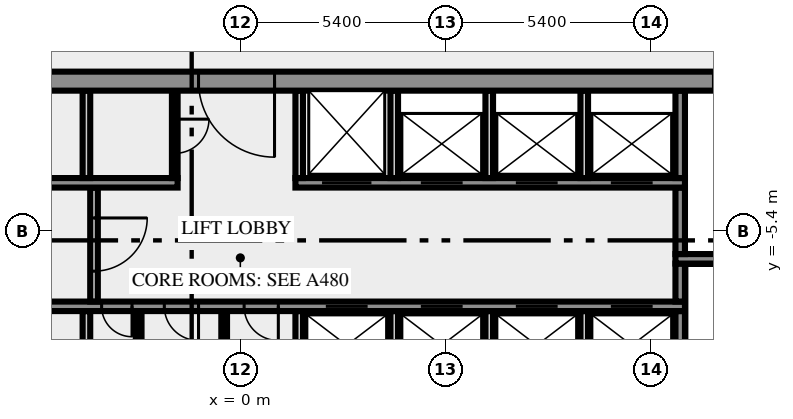
"""IFC4 building model, lengths in metres.
Left out: names, types, materials, properties, quantities, classifications, styles, units other than length and angle.
Written with IfcOpenShell. Run it as: python <this file> out.ifc"""

import sys

from ifc_helpers import new_model, si_unit, direction, frame, frame_2d, origin, place, context, subcontext, project, spatial, rectangle, extrude, element, fill, save


model = new_model("IFC4")
c1 = context("Model", 3, precision=1e-05, world=origin(), true_north=direction((0.0, 1.0)))
c2 = subcontext(c1, "Body", "Model", "MODEL_VIEW")
j1 = project(units=[si_unit("LENGTHUNIT", "METRE"), si_unit("PLANEANGLEUNIT", "RADIAN")], contexts=[c1])
p1 = place(None, origin())
s1 = spatial("IfcSite", under=j1, at=p1, CompositionType="ELEMENT")
p2 = place(p1, origin())
s2 = spatial("IfcBuilding", under=s1, at=p2, CompositionType="ELEMENT")
p3 = place(p2, frame((0.0, 0.0, 152.0)))
s3 = spatial("IfcBuildingStorey", under=s2, at=p3, CompositionType="ELEMENT", Elevation=152.0)
p4 = place(p3, frame((-4.05, -10.5, 0.0), z_axis=(0.0, 0.0, 1.0), x_axis=(0.0, 1.0, 0.0)))
e1 = element("IfcWall", 1, at=p4, inside=s3, PredefinedType="SOLIDWALL", context=c2, shape_type="SweptSolid", body=[
    extrude(rectangle(XDim=3.0, YDim=0.2, at=frame_2d((1.5, 0.0))), origin(), (0.0, 0.0, 1.0), 3.65),
])
for number, where, z_axis, x_axis in (
    (2, (-2.675, -10.5, 0.0), (0.0, 0.0, 1.0), (0.0, 1.0, 0.0)),
    (3, (-0.425, -10.5, 0.0), (0.0, 0.0, 1.0), (0.0, 1.0, 0.0)),
):
    element("IfcWall", number, at=place(p3, frame(where, z_axis=z_axis, x_axis=x_axis)), inside=s3, PredefinedType="PARTITIONING", context=c2, shape_type="SweptSolid", body=[
        extrude(rectangle(XDim=3.0, YDim=0.15, at=frame_2d((1.5, 0.0))), origin(), (0.0, 0.0, 1.0), 3.65),
    ])
for number, where, z_axis, x_axis in (
    (4, (1.55, -10.5, 0.0), (0.0, 0.0, 1.0), (0.0, 1.0, 0.0)),
    (5, (4.05, -10.5, 0.0), (0.0, 0.0, 1.0), (0.0, 1.0, 0.0)),
    (6, (6.55, -10.5, 0.0), (0.0, 0.0, 1.0), (0.0, 1.0, 0.0)),
    (7, (9.05, -10.5, 0.0), (0.0, 0.0, 1.0), (0.0, 1.0, 0.0)),
):
    element("IfcWall", number, at=place(p3, frame(where, z_axis=z_axis, x_axis=x_axis)), inside=s3, PredefinedType="SOLIDWALL", context=c2, shape_type="SweptSolid", body=[
        extrude(rectangle(XDim=3.0, YDim=0.2, at=frame_2d((1.5, 0.0))), origin(), (0.0, 0.0, 1.0), 3.65),
    ])
p5 = place(p3, frame((11.575, -10.5, 0.0), z_axis=(0.0, 0.0, 1.0), x_axis=(0.0, 1.0, 0.0)))
e8 = element("IfcWall", 8, at=p5, inside=s3, PredefinedType="SHEAR", context=c2, shape_type="SweptSolid", body=[
    extrude(rectangle(XDim=3.0, YDim=0.25, at=frame_2d((1.5, 0.0))), origin(), (0.0, 0.0, 1.0), 3.65),
])
p6 = place(p3, frame((11.7, -7.375, 0.0), z_axis=(0.0, 0.0, 1.0), x_axis=(-1.0, 0.0, 0.0)))
e9 = element("IfcWall", 9, at=p6, inside=s3, PredefinedType="SHEAR", context=c2, shape_type="SweptSolid", body=[
    extrude(rectangle(XDim=23.4, YDim=0.25, at=frame_2d((11.7, 0.0))), origin(), (0.0, 0.0, 1.0), 3.65),
])
p7 = place(p6, frame((21.812, 0.0, 0.0)))
e10 = element("IfcOpeningElement", 10, at=p7, cuts=e9, PredefinedType="OPENING", context=c2, shape_type="SweptSolid", body=[
    extrude(rectangle(XDim=0.9, YDim=2.1, at=frame_2d((0.45, 1.05))), frame((0.0, 0.135, 0.0), z_axis=(0.0, -1.0, 0.0), x_axis=(1.0, 0.0, 0.0)), (0.0, 0.0, 1.0), 0.27),
])
p8 = place(p6, frame((19.55, 0.0, 0.0)))
e11 = element("IfcOpeningElement", 11, at=p8, cuts=e9, PredefinedType="OPENING", context=c2, shape_type="SweptSolid", body=[
    extrude(rectangle(XDim=0.9, YDim=2.1, at=frame_2d((0.45, 1.05))), frame((0.0, 0.135, 0.0), z_axis=(0.0, -1.0, 0.0), x_axis=(1.0, 0.0, 0.0)), (0.0, 0.0, 1.0), 0.27),
])
p9 = place(p6, frame((16.787, 0.0, 0.0)))
e12 = element("IfcOpeningElement", 12, at=p9, cuts=e9, PredefinedType="OPENING", context=c2, shape_type="SweptSolid", body=[
    extrude(rectangle(XDim=0.9, YDim=2.1, at=frame_2d((0.45, 1.05))), frame((0.0, 0.135, 0.0), z_axis=(0.0, -1.0, 0.0), x_axis=(1.0, 0.0, 0.0)), (0.0, 0.0, 1.0), 0.27),
])
p10 = place(p6, frame((14.55, 0.0, 0.0)))
e13 = element("IfcOpeningElement", 13, at=p10, cuts=e9, PredefinedType="OPENING", context=c2, shape_type="SweptSolid", body=[
    extrude(rectangle(XDim=0.8, YDim=2.1, at=frame_2d((0.4, 1.05))), frame((0.0, 0.135, 0.0), z_axis=(0.0, -1.0, 0.0), x_axis=(1.0, 0.0, 0.0)), (0.0, 0.0, 1.0), 0.27),
])
p11 = place(p6, frame((12.8, 0.0, 0.0)))
e14 = element("IfcOpeningElement", 14, at=p11, cuts=e9, PredefinedType="OPENING", context=c2, shape_type="SweptSolid", body=[
    extrude(rectangle(XDim=0.9, YDim=2.1, at=frame_2d((0.45, 1.05))), frame((0.0, 0.135, 0.0), z_axis=(0.0, -1.0, 0.0), x_axis=(1.0, 0.0, 0.0)), (0.0, 0.0, 1.0), 0.27),
])
p12 = place(p6, frame((10.7, 0.0, 0.0)))
e15 = element("IfcOpeningElement", 15, at=p12, cuts=e9, PredefinedType="OPENING", context=c2, shape_type="SweptSolid", body=[
    extrude(rectangle(XDim=0.9, YDim=2.1, at=frame_2d((0.45, 1.05))), frame((0.0, 0.135, 0.0), z_axis=(0.0, -1.0, 0.0), x_axis=(1.0, 0.0, 0.0)), (0.0, 0.0, 1.0), 0.27),
])
p13 = place(p6, frame((8.35, 0.0, 0.0)))
e16 = element("IfcOpeningElement", 16, at=p13, cuts=e9, PredefinedType="OPENING", context=c2, shape_type="SweptSolid", body=[
    extrude(rectangle(XDim=1.1, YDim=2.1, at=frame_2d((0.55, 1.05))), frame((0.0, 0.135, 0.0), z_axis=(0.0, -1.0, 0.0), x_axis=(1.0, 0.0, 0.0)), (0.0, 0.0, 1.0), 0.27),
])
p14 = place(p6, frame((5.85, 0.0, 0.0)))
e17 = element("IfcOpeningElement", 17, at=p14, cuts=e9, PredefinedType="OPENING", context=c2, shape_type="SweptSolid", body=[
    extrude(rectangle(XDim=1.1, YDim=2.1, at=frame_2d((0.55, 1.05))), frame((0.0, 0.135, 0.0), z_axis=(0.0, -1.0, 0.0), x_axis=(1.0, 0.0, 0.0)), (0.0, 0.0, 1.0), 0.27),
])
p15 = place(p6, frame((3.35, 0.0, 0.0)))
e18 = element("IfcOpeningElement", 18, at=p15, cuts=e9, PredefinedType="OPENING", context=c2, shape_type="SweptSolid", body=[
    extrude(rectangle(XDim=1.1, YDim=2.1, at=frame_2d((0.55, 1.05))), frame((0.0, 0.135, 0.0), z_axis=(0.0, -1.0, 0.0), x_axis=(1.0, 0.0, 0.0)), (0.0, 0.0, 1.0), 0.27),
])
p16 = place(p6, frame((0.85, 0.0, 0.0)))
e19 = element("IfcOpeningElement", 19, at=p16, cuts=e9, PredefinedType="OPENING", context=c2, shape_type="SweptSolid", body=[
    extrude(rectangle(XDim=1.1, YDim=2.1, at=frame_2d((0.55, 1.05))), frame((0.0, 0.135, 0.0), z_axis=(0.0, -1.0, 0.0), x_axis=(1.0, 0.0, 0.0)), (0.0, 0.0, 1.0), 0.27),
])
p17 = place(p3, frame((-3.85, -4.25, 0.0), z_axis=(0.0, 0.0, 1.0), x_axis=(0.0, -1.0, 0.0)))
e20 = element("IfcWall", 20, at=p17, inside=s3, PredefinedType="SOLIDWALL", context=c2, shape_type="SweptSolid", body=[
    extrude(rectangle(XDim=3.0, YDim=0.2, at=frame_2d((1.5, 0.0))), origin(), (0.0, 0.0, 1.0), 3.65),
])
p18 = place(p17, frame((0.8, 0.0, 0.0)))
e21 = element("IfcOpeningElement", 21, at=p18, cuts=e20, PredefinedType="OPENING", context=c2, shape_type="SweptSolid", body=[
    extrude(rectangle(XDim=1.4, YDim=2.1, at=frame_2d((0.7, 1.05))), frame((0.0, 0.11, 0.0), z_axis=(0.0, -1.0, 0.0), x_axis=(1.0, 0.0, 0.0)), (0.0, 0.0, 1.0), 0.22),
])
p19 = place(p3, frame((11.575, -7.25, 0.0), z_axis=(0.0, 0.0, 1.0), x_axis=(0.0, 1.0, 0.0)))
e22 = element("IfcWall", 22, at=p19, inside=s3, PredefinedType="SHEAR", context=c2, shape_type="SweptSolid", body=[
    extrude(rectangle(XDim=1.0, YDim=0.25, at=frame_2d((0.5, 0.0))), origin(), (0.0, 0.0, 1.0), 3.65),
])
p20 = place(p3, frame((19.5, -6.125, 0.0), z_axis=(0.0, 0.0, 1.0), x_axis=(-1.0, 0.0, 0.0)))
e23 = element("IfcWall", 23, at=p20, inside=s3, PredefinedType="SHEAR", context=c2, shape_type="SweptSolid", body=[
    extrude(rectangle(XDim=8.05, YDim=0.25, at=frame_2d((4.025, 0.0))), origin(), (0.0, 0.0, 1.0), 3.65),
])
p21 = place(p20, frame((0.05, 0.0, 0.0)))
e24 = element("IfcOpeningElement", 24, at=p21, cuts=e23, PredefinedType="OPENING", context=c2, shape_type="SweptSolid", body=[
    extrude(rectangle(XDim=1.8, YDim=2.1, at=frame_2d((0.9, 1.05))), frame((0.0, 0.135, 0.0), z_axis=(0.0, -1.0, 0.0), x_axis=(1.0, 0.0, 0.0)), (0.0, 0.0, 1.0), 0.27),
])
p22 = place(p3, frame((11.575, -6.0, 0.0), z_axis=(0.0, 0.0, 1.0), x_axis=(0.0, 1.0, 0.0)))
e25 = element("IfcWall", 25, at=p22, inside=s3, PredefinedType="SHEAR", context=c2, shape_type="SweptSolid", body=[
    extrude(rectangle(XDim=1.75, YDim=0.25, at=frame_2d((0.875, 0.0))), origin(), (0.0, 0.0, 1.0), 3.65),
])
p23 = place(p3, frame((-11.7, -4.125, 0.0), z_axis=(0.0, 0.0, 1.0), x_axis=(1.0, 0.0, 0.0)))
e26 = element("IfcWall", 26, at=p23, inside=s3, PredefinedType="SHEAR", context=c2, shape_type="SweptSolid", body=[
    extrude(rectangle(XDim=10.05, YDim=0.25, at=frame_2d((5.025, 0.0))), origin(), (0.0, 0.0, 1.0), 3.65),
])
p24 = place(p3, frame((1.45, -4.125, 0.0), z_axis=(0.0, 0.0, 1.0), x_axis=(1.0, 0.0, 0.0)))
e27 = element("IfcWall", 27, at=p24, inside=s3, PredefinedType="SHEAR", context=c2, shape_type="SweptSolid", body=[
    extrude(rectangle(XDim=10.25, YDim=0.25, at=frame_2d((5.125, 0.0))), origin(), (0.0, 0.0, 1.0), 3.65),
])
p25 = place(p24, frame((0.7, 0.0, 0.0)))
e28 = element("IfcOpeningElement", 28, at=p25, cuts=e27, PredefinedType="OPENING", context=c2, shape_type="SweptSolid", body=[
    extrude(rectangle(XDim=1.3, YDim=2.1, at=frame_2d((0.65, 1.05))), frame((0.0, 0.135, 0.0), z_axis=(0.0, -1.0, 0.0), x_axis=(1.0, 0.0, 0.0)), (0.0, 0.0, 1.0), 0.27),
])
p26 = place(p24, frame((3.3, 0.0, 0.0)))
e29 = element("IfcOpeningElement", 29, at=p26, cuts=e27, PredefinedType="OPENING", context=c2, shape_type="SweptSolid", body=[
    extrude(rectangle(XDim=1.1, YDim=2.1, at=frame_2d((0.55, 1.05))), frame((0.0, 0.135, 0.0), z_axis=(0.0, -1.0, 0.0), x_axis=(1.0, 0.0, 0.0)), (0.0, 0.0, 1.0), 0.27),
])
p27 = place(p24, frame((5.8, 0.0, 0.0)))
e30 = element("IfcOpeningElement", 30, at=p27, cuts=e27, PredefinedType="OPENING", context=c2, shape_type="SweptSolid", body=[
    extrude(rectangle(XDim=1.1, YDim=2.1, at=frame_2d((0.55, 1.05))), frame((0.0, 0.135, 0.0), z_axis=(0.0, -1.0, 0.0), x_axis=(1.0, 0.0, 0.0)), (0.0, 0.0, 1.0), 0.27),
])
p28 = place(p24, frame((8.3, 0.0, 0.0)))
e31 = element("IfcOpeningElement", 31, at=p28, cuts=e27, PredefinedType="OPENING", context=c2, shape_type="SweptSolid", body=[
    extrude(rectangle(XDim=1.1, YDim=2.1, at=frame_2d((0.55, 1.05))), frame((0.0, 0.135, 0.0), z_axis=(0.0, -1.0, 0.0), x_axis=(1.0, 0.0, 0.0)), (0.0, 0.0, 1.0), 0.27),
])
p29 = place(p3, frame((-4.05, -4.0, 0.0), z_axis=(0.0, 0.0, 1.0), x_axis=(0.0, 1.0, 0.0)))
e32 = element("IfcWall", 32, at=p29, inside=s3, PredefinedType="SOLIDWALL", context=c2, shape_type="SweptSolid", body=[
    extrude(rectangle(XDim=2.3, YDim=0.2, at=frame_2d((1.15, 0.0))), origin(), (0.0, 0.0, 1.0), 3.65),
])
p30 = place(p3, frame((-1.725, -1.7, 0.0), z_axis=(0.0, 0.0, 1.0), x_axis=(0.0, -1.0, 0.0)))
e33 = element("IfcWall", 33, at=p30, inside=s3, PredefinedType="PARTITIONING", context=c2, shape_type="SweptSolid", body=[
    extrude(rectangle(XDim=2.3, YDim=0.15, at=frame_2d((1.15, 0.0))), origin(), (0.0, 0.0, 1.0), 3.65),
])
p31 = place(p30, frame((0.75, 0.0, 0.0)))
e34 = element("IfcOpeningElement", 34, at=p31, cuts=e33, PredefinedType="OPENING", context=c2, shape_type="SweptSolid", body=[
    extrude(rectangle(XDim=0.9, YDim=2.1, at=frame_2d((0.45, 1.05))), frame((0.0, 0.085, 0.0), z_axis=(0.0, -1.0, 0.0), x_axis=(1.0, 0.0, 0.0)), (0.0, 0.0, 1.0), 0.17),
])
for number, where, z_axis, x_axis in (
    (35, (1.55, -4.0, 0.0), (0.0, 0.0, 1.0), (0.0, 1.0, 0.0)),
    (36, (4.05, -4.0, 0.0), (0.0, 0.0, 1.0), (0.0, 1.0, 0.0)),
    (37, (6.55, -4.0, 0.0), (0.0, 0.0, 1.0), (0.0, 1.0, 0.0)),
    (38, (9.05, -4.0, 0.0), (0.0, 0.0, 1.0), (0.0, 1.0, 0.0)),
):
    element("IfcWall", number, at=place(p3, frame(where, z_axis=z_axis, x_axis=x_axis)), inside=s3, PredefinedType="SOLIDWALL", context=c2, shape_type="SweptSolid", body=[
        extrude(rectangle(XDim=2.3, YDim=0.2, at=frame_2d((1.15, 0.0))), origin(), (0.0, 0.0, 1.0), 3.65),
    ])
p32 = place(p3, frame((11.575, -4.0, 0.0), z_axis=(0.0, 0.0, 1.0), x_axis=(0.0, 1.0, 0.0)))
e39 = element("IfcWall", 39, at=p32, inside=s3, PredefinedType="SHEAR", context=c2, shape_type="SweptSolid", body=[
    extrude(rectangle(XDim=2.3, YDim=0.25, at=frame_2d((1.15, 0.0))), origin(), (0.0, 0.0, 1.0), 3.65),
])
p33 = place(p3, frame((20.49, -1.45, 0.0), z_axis=(0.0, 0.0, 1.0), x_axis=(-1.0, 0.0, 0.0)))
e40 = element("IfcWall", 40, at=p33, inside=s3, PredefinedType="SHEAR", context=c2, shape_type="SweptSolid", body=[
    extrude(rectangle(XDim=40.98, YDim=0.5, at=frame_2d((20.49, 0.0))), origin(), (0.0, 0.0, 1.0), 3.65),
])
p34 = place(p33, frame((38.14, 0.0, 0.0)))
e41 = element("IfcOpeningElement", 41, at=p34, cuts=e40, PredefinedType="OPENING", context=c2, shape_type="SweptSolid", body=[
    extrude(rectangle(XDim=1.8, YDim=2.1, at=frame_2d((0.9, 1.05))), frame((0.0, 0.26, 0.0), z_axis=(0.0, -1.0, 0.0), x_axis=(1.0, 0.0, 0.0)), (0.0, 0.0, 1.0), 0.52),
])
p35 = place(p33, frame((35.89, 0.0, 0.0)))
e42 = element("IfcOpeningElement", 42, at=p35, cuts=e40, PredefinedType="OPENING", context=c2, shape_type="SweptSolid", body=[
    extrude(rectangle(XDim=0.9, YDim=2.1, at=frame_2d((0.45, 1.05))), frame((0.0, 0.26, 0.0), z_axis=(0.0, -1.0, 0.0), x_axis=(1.0, 0.0, 0.0)), (0.0, 0.0, 1.0), 0.52),
])
p36 = place(p33, frame((32.94, 0.0, 0.0)))
e43 = element("IfcOpeningElement", 43, at=p36, cuts=e40, PredefinedType="OPENING", context=c2, shape_type="SweptSolid", body=[
    extrude(rectangle(XDim=0.9, YDim=2.1, at=frame_2d((0.45, 1.05))), frame((0.0, 0.26, 0.0), z_axis=(0.0, -1.0, 0.0), x_axis=(1.0, 0.0, 0.0)), (0.0, 0.0, 1.0), 0.52),
])
p37 = place(p33, frame((29.802, 0.0, 0.0)))
e44 = element("IfcOpeningElement", 44, at=p37, cuts=e40, PredefinedType="OPENING", context=c2, shape_type="SweptSolid", body=[
    extrude(rectangle(XDim=0.9, YDim=2.1, at=frame_2d((0.45, 1.05))), frame((0.0, 0.26, 0.0), z_axis=(0.0, -1.0, 0.0), x_axis=(1.0, 0.0, 0.0)), (0.0, 0.0, 1.0), 0.52),
])
p38 = place(p33, frame((26.077, 0.0, 0.0)))
e45 = element("IfcOpeningElement", 45, at=p38, cuts=e40, PredefinedType="OPENING", context=c2, shape_type="SweptSolid", body=[
    extrude(rectangle(XDim=0.9, YDim=2.1, at=frame_2d((0.45, 1.05))), frame((0.0, 0.26, 0.0), z_axis=(0.0, -1.0, 0.0), x_axis=(1.0, 0.0, 0.0)), (0.0, 0.0, 1.0), 0.52),
])
p39 = place(p33, frame((19.59, 0.0, 0.0)))
e46 = element("IfcOpeningElement", 46, at=p39, cuts=e40, PredefinedType="OPENING", context=c2, shape_type="SweptSolid", body=[
    extrude(rectangle(XDim=2.0, YDim=2.1, at=frame_2d((1.0, 1.05))), frame((0.0, 0.26, 0.0), z_axis=(0.0, -1.0, 0.0), x_axis=(1.0, 0.0, 0.0)), (0.0, 0.0, 1.0), 0.52),
])
p40 = place(p33, frame((7.14, 0.0, 0.0)))
e47 = element("IfcOpeningElement", 47, at=p40, cuts=e40, PredefinedType="OPENING", context=c2, shape_type="SweptSolid", body=[
    extrude(rectangle(XDim=0.9, YDim=2.1, at=frame_2d((0.45, 1.05))), frame((0.0, 0.26, 0.0), z_axis=(0.0, -1.0, 0.0), x_axis=(1.0, 0.0, 0.0)), (0.0, 0.0, 1.0), 0.52),
])
p41 = place(p33, frame((5.028, 0.0, 0.0)))
e48 = element("IfcOpeningElement", 48, at=p41, cuts=e40, PredefinedType="OPENING", context=c2, shape_type="SweptSolid", body=[
    extrude(rectangle(XDim=0.8, YDim=2.1, at=frame_2d((0.4, 1.05))), frame((0.0, 0.26, 0.0), z_axis=(0.0, -1.0, 0.0), x_axis=(1.0, 0.0, 0.0)), (0.0, 0.0, 1.0), 0.52),
])
p42 = place(p33, frame((3.452, 0.0, 0.0)))
e49 = element("IfcOpeningElement", 49, at=p42, cuts=e40, PredefinedType="OPENING", context=c2, shape_type="SweptSolid", body=[
    extrude(rectangle(XDim=0.8, YDim=2.1, at=frame_2d((0.4, 1.05))), frame((0.0, 0.26, 0.0), z_axis=(0.0, -1.0, 0.0), x_axis=(1.0, 0.0, 0.0)), (0.0, 0.0, 1.0), 0.52),
])
p43 = place(p33, frame((1.04, 0.0, 0.0)))
e50 = element("IfcOpeningElement", 50, at=p43, cuts=e40, PredefinedType="OPENING", context=c2, shape_type="SweptSolid", body=[
    extrude(rectangle(XDim=1.8, YDim=2.1, at=frame_2d((0.9, 1.05))), frame((0.0, 0.26, 0.0), z_axis=(0.0, -1.0, 0.0), x_axis=(1.0, 0.0, 0.0)), (0.0, 0.0, 1.0), 0.52),
])
p44 = place(p10, origin())
e51 = element("IfcDoor", 51, at=p44, inside=s3, OperationType="SINGLE_SWING_RIGHT", PredefinedType="DOOR", context=c2, shape_type="SweptSolid", body=[
    extrude(rectangle(XDim=0.8, YDim=2.1, at=frame_2d((0.4, 1.05))), frame((0.0, 0.025, 0.0), z_axis=(0.0, -1.0, 0.0), x_axis=(1.0, 0.0, 0.0)), (0.0, 0.0, 1.0), 0.05),
])
fill(e13, e51)
p45 = place(p11, origin())
e52 = element("IfcDoor", 52, at=p45, inside=s3, OperationType="SINGLE_SWING_RIGHT", PredefinedType="DOOR", context=c2, shape_type="SweptSolid", body=[
    extrude(rectangle(XDim=0.9, YDim=2.1, at=frame_2d((0.45, 1.05))), frame((0.0, 0.025, 0.0), z_axis=(0.0, -1.0, 0.0), x_axis=(1.0, 0.0, 0.0)), (0.0, 0.0, 1.0), 0.05),
])
fill(e14, e52)
p46 = place(p12, origin())
e53 = element("IfcDoor", 53, at=p46, inside=s3, OperationType="SINGLE_SWING_LEFT", PredefinedType="DOOR", context=c2, shape_type="SweptSolid", body=[
    extrude(rectangle(XDim=0.9, YDim=2.1, at=frame_2d((0.45, 1.05))), frame((0.0, 0.025, 0.0), z_axis=(0.0, -1.0, 0.0), x_axis=(1.0, 0.0, 0.0)), (0.0, 0.0, 1.0), 0.05),
])
fill(e15, e53)
p47 = place(p13, origin())
e54 = element("IfcDoor", 54, at=p47, inside=s3, OperationType="DOUBLE_DOOR_SLIDING", PredefinedType="DOOR", context=c2, shape_type="SweptSolid", body=[
    extrude(rectangle(XDim=1.1, YDim=2.1, at=frame_2d((0.55, 1.05))), frame((0.0, 0.025, 0.0), z_axis=(0.0, -1.0, 0.0), x_axis=(1.0, 0.0, 0.0)), (0.0, 0.0, 1.0), 0.05),
])
fill(e16, e54)
p48 = place(p14, origin())
e55 = element("IfcDoor", 55, at=p48, inside=s3, OperationType="DOUBLE_DOOR_SLIDING", PredefinedType="DOOR", context=c2, shape_type="SweptSolid", body=[
    extrude(rectangle(XDim=1.1, YDim=2.1, at=frame_2d((0.55, 1.05))), frame((0.0, 0.025, 0.0), z_axis=(0.0, -1.0, 0.0), x_axis=(1.0, 0.0, 0.0)), (0.0, 0.0, 1.0), 0.05),
])
fill(e17, e55)
p49 = place(p15, origin())
e56 = element("IfcDoor", 56, at=p49, inside=s3, OperationType="DOUBLE_DOOR_SLIDING", PredefinedType="DOOR", context=c2, shape_type="SweptSolid", body=[
    extrude(rectangle(XDim=1.1, YDim=2.1, at=frame_2d((0.55, 1.05))), frame((0.0, 0.025, 0.0), z_axis=(0.0, -1.0, 0.0), x_axis=(1.0, 0.0, 0.0)), (0.0, 0.0, 1.0), 0.05),
])
fill(e18, e56)
p50 = place(p16, origin())
e57 = element("IfcDoor", 57, at=p50, inside=s3, OperationType="DOUBLE_DOOR_SLIDING", PredefinedType="DOOR", context=c2, shape_type="SweptSolid", body=[
    extrude(rectangle(XDim=1.1, YDim=2.1, at=frame_2d((0.55, 1.05))), frame((0.0, 0.025, 0.0), z_axis=(0.0, -1.0, 0.0), x_axis=(1.0, 0.0, 0.0)), (0.0, 0.0, 1.0), 0.05),
])
fill(e19, e57)
p51 = place(p18, origin())
e58 = element("IfcDoor", 58, at=p51, inside=s3, OperationType="DOUBLE_DOOR_SINGLE_SWING", PredefinedType="DOOR", context=c2, shape_type="SweptSolid", body=[
    extrude(rectangle(XDim=1.4, YDim=2.1, at=frame_2d((0.7, 1.05))), frame((0.0, 0.025, 0.0), z_axis=(0.0, -1.0, 0.0), x_axis=(1.0, 0.0, 0.0)), (0.0, 0.0, 1.0), 0.05),
])
fill(e21, e58)
p52 = place(p25, origin())
e59 = element("IfcDoor", 59, at=p52, inside=s3, OperationType="DOUBLE_DOOR_SLIDING", PredefinedType="DOOR", context=c2, shape_type="SweptSolid", body=[
    extrude(rectangle(XDim=1.3, YDim=2.1, at=frame_2d((0.65, 1.05))), frame((0.0, 0.025, 0.0), z_axis=(0.0, -1.0, 0.0), x_axis=(1.0, 0.0, 0.0)), (0.0, 0.0, 1.0), 0.05),
])
fill(e28, e59)
p53 = place(p26, origin())
e60 = element("IfcDoor", 60, at=p53, inside=s3, OperationType="DOUBLE_DOOR_SLIDING", PredefinedType="DOOR", context=c2, shape_type="SweptSolid", body=[
    extrude(rectangle(XDim=1.1, YDim=2.1, at=frame_2d((0.55, 1.05))), frame((0.0, 0.025, 0.0), z_axis=(0.0, -1.0, 0.0), x_axis=(1.0, 0.0, 0.0)), (0.0, 0.0, 1.0), 0.05),
])
fill(e29, e60)
p54 = place(p27, origin())
e61 = element("IfcDoor", 61, at=p54, inside=s3, OperationType="DOUBLE_DOOR_SLIDING", PredefinedType="DOOR", context=c2, shape_type="SweptSolid", body=[
    extrude(rectangle(XDim=1.1, YDim=2.1, at=frame_2d((0.55, 1.05))), frame((0.0, 0.025, 0.0), z_axis=(0.0, -1.0, 0.0), x_axis=(1.0, 0.0, 0.0)), (0.0, 0.0, 1.0), 0.05),
])
fill(e30, e61)
p55 = place(p28, origin())
e62 = element("IfcDoor", 62, at=p55, inside=s3, OperationType="DOUBLE_DOOR_SLIDING", PredefinedType="DOOR", context=c2, shape_type="SweptSolid", body=[
    extrude(rectangle(XDim=1.1, YDim=2.1, at=frame_2d((0.55, 1.05))), frame((0.0, 0.025, 0.0), z_axis=(0.0, -1.0, 0.0), x_axis=(1.0, 0.0, 0.0)), (0.0, 0.0, 1.0), 0.05),
])
fill(e31, e62)
p56 = place(p31, origin())
e63 = element("IfcDoor", 63, at=p56, inside=s3, OperationType="SINGLE_SWING_RIGHT", PredefinedType="DOOR", context=c2, shape_type="SweptSolid", body=[
    extrude(rectangle(XDim=0.9, YDim=2.1, at=frame_2d((0.45, 1.05))), frame((0.0, 0.025, 0.0), z_axis=(0.0, -1.0, 0.0), x_axis=(1.0, 0.0, 0.0)), (0.0, 0.0, 1.0), 0.05),
])
fill(e34, e63)
p57 = place(p39, origin())
e64 = element("IfcDoor", 64, at=p57, inside=s3, OperationType="DOUBLE_DOOR_SINGLE_SWING", PredefinedType="DOOR", context=c2, shape_type="SweptSolid", body=[
    extrude(rectangle(XDim=2.0, YDim=2.1, at=frame_2d((1.0, 1.05))), frame((0.0, 0.025, 0.0), z_axis=(0.0, -1.0, 0.0), x_axis=(1.0, 0.0, 0.0)), (0.0, 0.0, 1.0), 0.05),
])
fill(e46, e64)
save(model, sys.argv[1])
